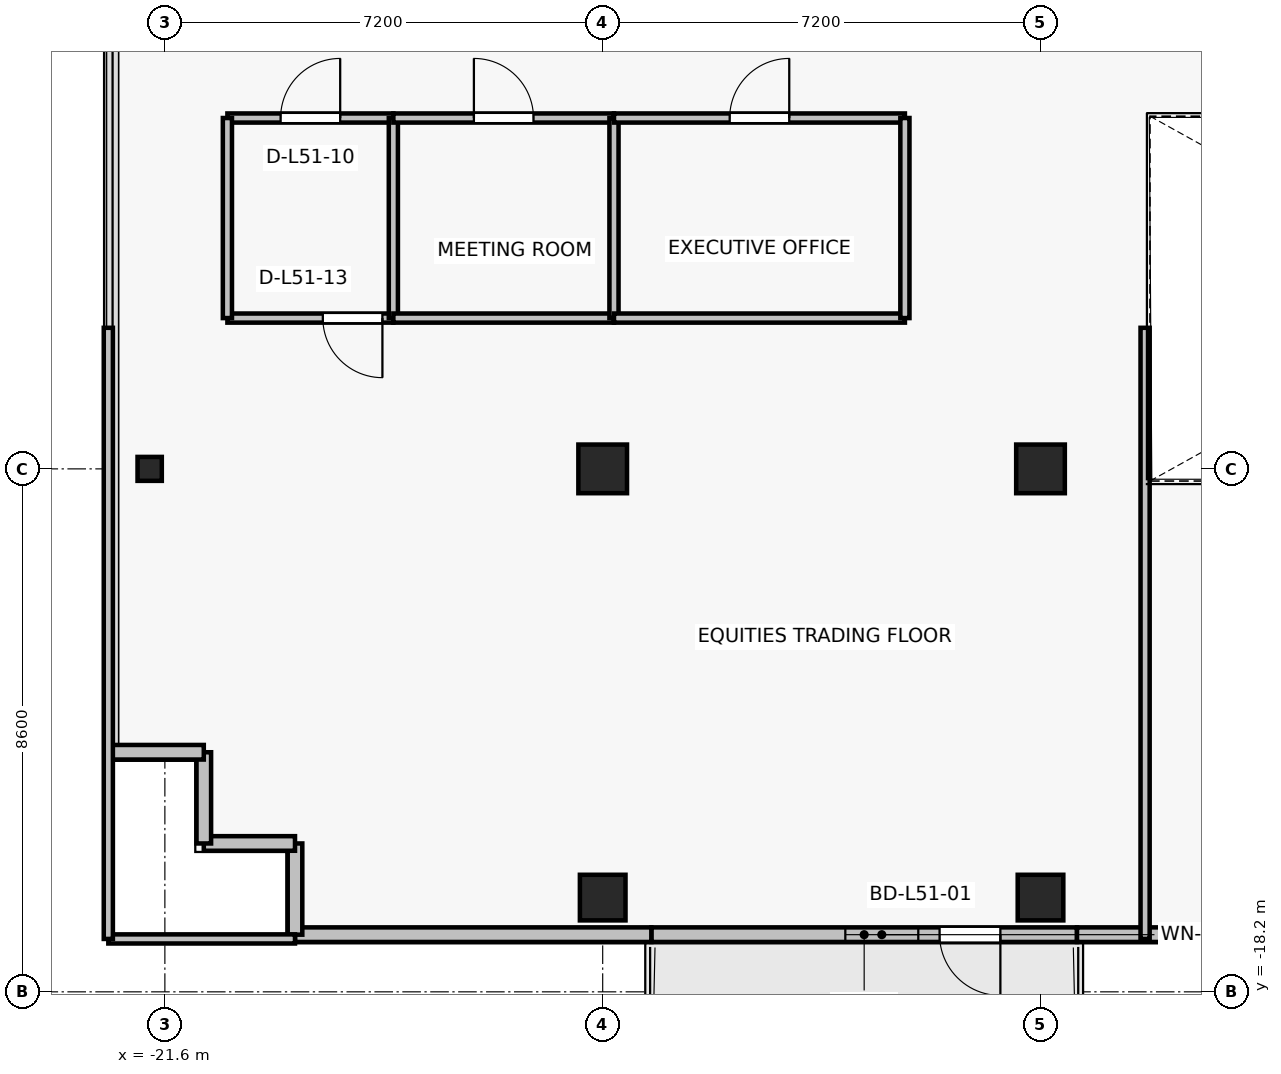
"""IFC4 building model, lengths in metres.
Left out: names, types, materials, properties, quantities, classifications, styles, units other than length and angle.
Written with IfcOpenShell. Run it as: python <this file> out.ifc"""

import sys

from ifc_helpers import new_model, si_unit, direction, frame, frame_2d, origin, origin_2d, place, context, subcontext, project, spatial, rectangle, i_section, extrude, source, transform, mapped, element, fill, save


model = new_model("IFC4")
c1 = context("Model", 3, precision=1e-05, world=origin(), true_north=direction((0.0, 1.0)))
c2 = subcontext(c1, "Body", "Model", "MODEL_VIEW")
j1 = project(units=[si_unit("LENGTHUNIT", "METRE"), si_unit("PLANEANGLEUNIT", "RADIAN")], contexts=[c1])
p1 = place(None, origin())
s1 = spatial("IfcSite", under=j1, at=p1, CompositionType="ELEMENT")
p2 = place(p1, origin())
s2 = spatial("IfcBuilding", under=s1, at=p2, CompositionType="ELEMENT")
p3 = place(p2, frame((0.0, 0.0, 182.5)))
s3 = spatial("IfcBuildingStorey", under=s2, at=p3, CompositionType="ELEMENT", Elevation=182.5)
for number, where, z_axis, x_axis in (
    (1, (-14.4, -9.6, 0.0), (0.0, 0.0, 1.0), (1.0, 0.0, 0.0)),
    (2, (-7.2, -9.6, 0.0), (0.0, 0.0, 1.0), (1.0, 0.0, 0.0)),
):
    element("IfcColumn", number, at=place(p3, frame(where, z_axis=z_axis, x_axis=x_axis)), inside=s3, PredefinedType="COLUMN", context=c2, shape_type="SweptSolid", body=[
        extrude(rectangle(XDim=0.8, YDim=0.8, at=origin_2d()), origin(), (0.0, 0.0, 1.0), 3.3),
    ])
for number, where, z_axis, x_axis in (
    (3, (-14.4, -16.65, 0.0), (0.0, 0.0, 1.0), (1.0, 0.0, 0.0)),
    (4, (-7.2, -16.65, 0.0), (0.0, 0.0, 1.0), (1.0, 0.0, 0.0)),
):
    element("IfcColumn", number, at=place(p3, frame(where, z_axis=z_axis, x_axis=x_axis)), inside=s3, PredefinedType="COLUMN", context=c2, shape_type="SweptSolid", body=[
        extrude(rectangle(XDim=0.75, YDim=0.75, at=origin_2d()), origin(), (0.0, 0.0, 1.0), 3.3),
    ])
p4 = place(p3, frame((-21.85, -9.6, 0.0), z_axis=(0.0, 0.0, 1.0), x_axis=(1.0, 0.0, 0.0)))
e5 = element("IfcColumn", 5, at=p4, inside=s3, PredefinedType="COLUMN", context=c2, shape_type="SweptSolid", body=[
    extrude(i_section(OverallWidth=0.399, OverallDepth=0.394, WebThickness=0.023, FlangeThickness=0.037, FilletRadius=0.015, at=origin_2d()), origin(), (0.0, 0.0, 1.0), 3.3),
])
p5 = place(p3, frame((-6.6, -17.26, 0.0), z_axis=(0.0, 0.0, 1.0), x_axis=(-1.0, 0.0, 0.0)))
e6 = element("IfcWall", 6, at=p5, inside=s3, PredefinedType="SOLIDWALL", context=c2, shape_type="SweptSolid", body=[
    extrude(rectangle(XDim=7.0, YDim=0.24, at=frame_2d((3.5, 0.0))), origin(), (0.0, 0.0, 1.0), 2.665),
])
p6 = place(p5, frame((1.26, 0.0, 0.0)))
e7 = element("IfcOpeningElement", 7, at=p6, cuts=e6, PredefinedType="OPENING", context=c2, shape_type="SweptSolid", body=[
    extrude(rectangle(XDim=1.0, YDim=2.2, at=frame_2d((0.5, 1.1))), frame((0.0, 0.13, 0.0), z_axis=(0.0, -1.0, 0.0), x_axis=(1.0, 0.0, 0.0)), (0.0, 0.0, 1.0), 0.26),
])
p7 = place(p5, frame((2.61, 0.0, 0.85)))
e8 = element("IfcOpeningElement", 8, at=p7, cuts=e6, PredefinedType="OPENING", context=c2, shape_type="SweptSolid", body=[
    extrude(rectangle(XDim=1.2, YDim=1.5, at=frame_2d((0.6, 0.75))), frame((0.0, 0.13, 0.0), z_axis=(0.0, -1.0, 0.0), x_axis=(1.0, 0.0, 0.0)), (0.0, 0.0, 1.0), 0.26),
])
p8 = place(p3, frame((-6.6, -17.26, 0.0), z_axis=(0.0, 0.0, 1.0), x_axis=(1.0, 0.0, 0.0)))
e9 = element("IfcWall", 9, at=p8, inside=s3, PredefinedType="SOLIDWALL", context=c2, shape_type="SweptSolid", body=[
    extrude(rectangle(XDim=3.4, YDim=0.24, at=frame_2d((1.7, 0.0))), origin(), (0.0, 0.0, 1.0), 3.075),
])
p9 = place(p3, frame((-19.46, -17.26, 0.0), z_axis=(0.0, 0.0, 1.0), x_axis=(1.0, 0.0, 0.0)))
e10 = element("IfcWall", 10, at=p9, inside=s3, PredefinedType="SOLIDWALL", context=c2, shape_type="SweptSolid", body=[
    extrude(rectangle(XDim=5.86, YDim=0.24, at=frame_2d((2.93, 0.0))), origin(), (0.0, 0.0, 1.0), 2.665),
])
for number, where, z_axis, x_axis in (
    (11, (-19.46, -15.76, 0.0), (0.0, 0.0, 1.0), (0.0, -1.0, 0.0)),
    (12, (-20.96, -15.76, 0.0), (0.0, 0.0, 1.0), (1.0, 0.0, 0.0)),
    (13, (-20.96, -14.26, 0.0), (0.0, 0.0, 1.0), (0.0, -1.0, 0.0)),
    (14, (-22.46, -14.26, 0.0), (0.0, 0.0, 1.0), (1.0, 0.0, 0.0)),
):
    element("IfcWall", number, at=place(p3, frame(where, z_axis=z_axis, x_axis=x_axis)), inside=s3, PredefinedType="SOLIDWALL", context=c2, shape_type="SweptSolid", body=[
        extrude(rectangle(XDim=1.5, YDim=0.24, at=frame_2d((0.75, 0.0))), origin(), (0.0, 0.0, 1.0), 3.075),
    ])
p10 = place(p3, frame((-17.843, -7.12, 0.0), z_axis=(0.0, 0.0, 1.0), x_axis=(-1.0, 0.0, 0.0)))
e15 = element("IfcWall", 15, at=p10, inside=s3, PredefinedType="PARTITIONING", context=c2, shape_type="SweptSolid", body=[
    extrude(rectangle(XDim=2.729, YDim=0.15, at=frame_2d((1.365, 0.0))), origin(), (0.0, 0.0, 1.0), 3.075),
])
p11 = place(p10, frame((0.18, 0.0, 0.0)))
e16 = element("IfcOpeningElement", 16, at=p11, cuts=e15, PredefinedType="OPENING", context=c2, shape_type="SweptSolid", body=[
    extrude(rectangle(XDim=0.98, YDim=2.15, at=frame_2d((0.49, 1.075))), frame((0.0, 0.085, 0.0), z_axis=(0.0, -1.0, 0.0), x_axis=(1.0, 0.0, 0.0)), (0.0, 0.0, 1.0), 0.17),
])
p12 = place(p3, frame((-20.572, -3.83, 0.0), z_axis=(0.0, 0.0, 1.0), x_axis=(1.0, 0.0, 0.0)))
e17 = element("IfcWall", 17, at=p12, inside=s3, PredefinedType="PARTITIONING", context=c2, shape_type="SweptSolid", body=[
    extrude(rectangle(XDim=2.729, YDim=0.15, at=frame_2d((1.365, 0.0))), origin(), (0.0, 0.0, 1.0), 3.075),
])
p13 = place(p12, frame((0.875, 0.0, 0.0)))
e18 = element("IfcOpeningElement", 18, at=p13, cuts=e17, PredefinedType="OPENING", context=c2, shape_type="SweptSolid", body=[
    extrude(rectangle(XDim=0.98, YDim=2.15, at=frame_2d((0.49, 1.075))), frame((0.0, 0.085, 0.0), z_axis=(0.0, -1.0, 0.0), x_axis=(1.0, 0.0, 0.0)), (0.0, 0.0, 1.0), 0.17),
])
for number, where, z_axis, x_axis in (
    (19, (-20.572, -7.12, 0.0), (0.0, 0.0, 1.0), (0.0, 1.0, 0.0)),
    (20, (-17.843, -3.83, 0.0), (0.0, 0.0, 1.0), (0.0, -1.0, 0.0)),
):
    element("IfcWall", number, at=place(p3, frame(where, z_axis=z_axis, x_axis=x_axis)), inside=s3, PredefinedType="PARTITIONING", context=c2, shape_type="SweptSolid", body=[
        extrude(rectangle(XDim=3.29, YDim=0.15, at=frame_2d((1.645, 0.0))), origin(), (0.0, 0.0, 1.0), 2.665),
    ])
p14 = place(p3, frame((-14.214, -7.12, 0.0), z_axis=(0.0, 0.0, 1.0), x_axis=(-1.0, 0.0, 0.0)))
e21 = element("IfcWall", 21, at=p14, inside=s3, PredefinedType="PARTITIONING", context=c2, shape_type="SweptSolid", body=[
    extrude(rectangle(XDim=3.628, YDim=0.15, at=frame_2d((1.814, 0.0))), origin(), (0.0, 0.0, 1.0), 2.565),
])
p15 = place(p3, frame((-17.843, -3.83, 0.0), z_axis=(0.0, 0.0, 1.0), x_axis=(1.0, 0.0, 0.0)))
e22 = element("IfcWall", 22, at=p15, inside=s3, PredefinedType="PARTITIONING", context=c2, shape_type="SweptSolid", body=[
    extrude(rectangle(XDim=3.628, YDim=0.15, at=frame_2d((1.814, 0.0))), origin(), (0.0, 0.0, 1.0), 2.565),
])
p16 = place(p15, frame((1.324, 0.0, 0.0)))
e23 = element("IfcOpeningElement", 23, at=p16, cuts=e22, PredefinedType="OPENING", context=c2, shape_type="SweptSolid", body=[
    extrude(rectangle(XDim=0.98, YDim=2.15, at=frame_2d((0.49, 1.075))), frame((0.0, 0.085, 0.0), z_axis=(0.0, -1.0, 0.0), x_axis=(1.0, 0.0, 0.0)), (0.0, 0.0, 1.0), 0.17),
])
p17 = place(p3, frame((-14.214, -3.83, 0.0), z_axis=(0.0, 0.0, 1.0), x_axis=(0.0, -1.0, 0.0)))
e24 = element("IfcWall", 24, at=p17, inside=s3, PredefinedType="PARTITIONING", context=c2, shape_type="SweptSolid", body=[
    extrude(rectangle(XDim=3.29, YDim=0.15, at=frame_2d((1.645, 0.0))), origin(), (0.0, 0.0, 1.0), 2.565),
])
p18 = place(p3, frame((-9.43, -7.12, 0.0), z_axis=(0.0, 0.0, 1.0), x_axis=(-1.0, 0.0, 0.0)))
e25 = element("IfcWall", 25, at=p18, inside=s3, PredefinedType="PARTITIONING", context=c2, shape_type="SweptSolid", body=[
    extrude(rectangle(XDim=4.784, YDim=0.15, at=frame_2d((2.392, 0.0))), origin(), (0.0, 0.0, 1.0), 2.565),
])
p19 = place(p3, frame((-14.214, -3.83, 0.0), z_axis=(0.0, 0.0, 1.0), x_axis=(1.0, 0.0, 0.0)))
e26 = element("IfcWall", 26, at=p19, inside=s3, PredefinedType="PARTITIONING", context=c2, shape_type="SweptSolid", body=[
    extrude(rectangle(XDim=4.784, YDim=0.15, at=frame_2d((2.392, 0.0))), origin(), (0.0, 0.0, 1.0), 2.565),
])
p20 = place(p19, frame((1.902, 0.0, 0.0)))
e27 = element("IfcOpeningElement", 27, at=p20, cuts=e26, PredefinedType="OPENING", context=c2, shape_type="SweptSolid", body=[
    extrude(rectangle(XDim=0.98, YDim=2.15, at=frame_2d((0.49, 1.075))), frame((0.0, 0.085, 0.0), z_axis=(0.0, -1.0, 0.0), x_axis=(1.0, 0.0, 0.0)), (0.0, 0.0, 1.0), 0.17),
])
p21 = place(p3, frame((-9.43, -3.83, 0.0), z_axis=(0.0, 0.0, 1.0), x_axis=(0.0, -1.0, 0.0)))
e28 = element("IfcWall", 28, at=p21, inside=s3, PredefinedType="PARTITIONING", context=c2, shape_type="SweptSolid", body=[
    extrude(rectangle(XDim=3.29, YDim=0.15, at=frame_2d((1.645, 0.0))), origin(), (0.0, 0.0, 1.0), 2.665),
])
p22 = place(p3, frame((-19.46, -17.33, 0.0), z_axis=(0.0, 0.0, 1.0), x_axis=(-1.0, 0.0, 0.0)))
e29 = element("IfcWall", 29, at=p22, inside=s3, PredefinedType="PARTITIONING", context=c2, shape_type="SweptSolid", body=[
    extrude(rectangle(XDim=3.07, YDim=0.15, at=frame_2d((1.535, 0.0))), origin(), (0.0, 0.0, 1.0), 2.665),
])
p23 = place(p3, frame((-22.53, -17.33, 0.0), z_axis=(0.0, 0.0, 1.0), x_axis=(0.0, 1.0, 0.0)))
e30 = element("IfcWall", 30, at=p23, inside=s3, PredefinedType="PARTITIONING", context=c2, shape_type="SweptSolid", body=[
    extrude(rectangle(XDim=10.05, YDim=0.15, at=frame_2d((5.025, 0.0))), origin(), (0.0, 0.0, 1.0), 2.665),
])
p24 = place(p3, frame((-5.48, -7.28, 0.0), z_axis=(0.0, 0.0, 1.0), x_axis=(0.0, -1.0, 0.0)))
e31 = element("IfcWall", 31, at=p24, inside=s3, PredefinedType="PARTITIONING", context=c2, shape_type="SweptSolid", body=[
    extrude(rectangle(XDim=10.05, YDim=0.15, at=frame_2d((5.025, 0.0))), origin(), (0.0, 0.0, 1.0), 2.565),
])
m1 = source(origin(), c2, "Body", "SweptSolid", [
    extrude(rectangle(XDim=1.0, YDim=2.2, at=frame_2d((0.5, 1.1))), frame((0.0, 0.025, 0.0), z_axis=(0.0, -1.0, 0.0), x_axis=(1.0, 0.0, 0.0)), (0.0, 0.0, 1.0), 0.05),
])
p25 = place(p6, origin())
e32 = element("IfcDoor", 32, at=p25, inside=s3, OperationType="SINGLE_SWING_LEFT", PredefinedType="DOOR", context=c2, shape_type="MappedRepresentation", body=[
    mapped(m1, transform((0.0, 0.0, 0.0), x_axis=(1.0, 0.0, 0.0), y_axis=(0.0, 1.0, 0.0), z_axis=(0.0, 0.0, 1.0), scale=1.0)),
])
fill(e7, e32)
m2 = source(origin(), c2, "Body", "SweptSolid", [
    extrude(rectangle(XDim=1.2, YDim=1.5, at=frame_2d((0.6, 0.75))), frame((0.0, 0.03, 0.0), z_axis=(0.0, -1.0, 0.0), x_axis=(1.0, 0.0, 0.0)), (0.0, 0.0, 1.0), 0.06),
])
p26 = place(p7, origin())
e33 = element("IfcWindow", 33, at=p26, inside=s3, PartitioningType="SINGLE_PANEL", PredefinedType="WINDOW", context=c2, shape_type="MappedRepresentation", body=[
    mapped(m2, transform((0.0, 0.0, 0.0), x_axis=(1.0, 0.0, 0.0), y_axis=(0.0, 1.0, 0.0), z_axis=(0.0, 0.0, 1.0), scale=1.0)),
])
fill(e8, e33)
m3 = source(origin(), c2, "Body", "SweptSolid", [
    extrude(rectangle(XDim=0.98, YDim=2.15, at=frame_2d((0.49, 1.075))), frame((0.0, 0.025, 0.0), z_axis=(0.0, -1.0, 0.0), x_axis=(1.0, 0.0, 0.0)), (0.0, 0.0, 1.0), 0.05),
])
p27 = place(p13, origin())
e34 = element("IfcDoor", 34, at=p27, inside=s3, OperationType="SINGLE_SWING_RIGHT", PredefinedType="DOOR", context=c2, shape_type="MappedRepresentation", body=[
    mapped(m3, transform((0.0, 0.0, 0.0), x_axis=(1.0, 0.0, 0.0), y_axis=(0.0, 1.0, 0.0), z_axis=(0.0, 0.0, 1.0), scale=1.0)),
])
fill(e18, e34)
p28 = place(p16, origin())
e35 = element("IfcDoor", 35, at=p28, inside=s3, OperationType="SINGLE_SWING_LEFT", PredefinedType="DOOR", context=c2, shape_type="MappedRepresentation", body=[
    mapped(m3, transform((0.0, 0.0, 0.0), x_axis=(1.0, 0.0, 0.0), y_axis=(0.0, 1.0, 0.0), z_axis=(0.0, 0.0, 1.0), scale=1.0)),
])
fill(e23, e35)
p29 = place(p20, origin())
e36 = element("IfcDoor", 36, at=p29, inside=s3, OperationType="SINGLE_SWING_RIGHT", PredefinedType="DOOR", context=c2, shape_type="MappedRepresentation", body=[
    mapped(m3, transform((0.0, 0.0, 0.0), x_axis=(1.0, 0.0, 0.0), y_axis=(0.0, 1.0, 0.0), z_axis=(0.0, 0.0, 1.0), scale=1.0)),
])
fill(e27, e36)
p30 = place(p11, origin())
e37 = element("IfcDoor", 37, at=p30, inside=s3, OperationType="SINGLE_SWING_LEFT", PredefinedType="DOOR", context=c2, shape_type="MappedRepresentation", body=[
    mapped(m3, transform((0.0, 0.0, 0.0), x_axis=(1.0, 0.0, 0.0), y_axis=(0.0, 1.0, 0.0), z_axis=(0.0, 0.0, 1.0), scale=1.0)),
])
fill(e16, e37)
save(model, sys.argv[1])
